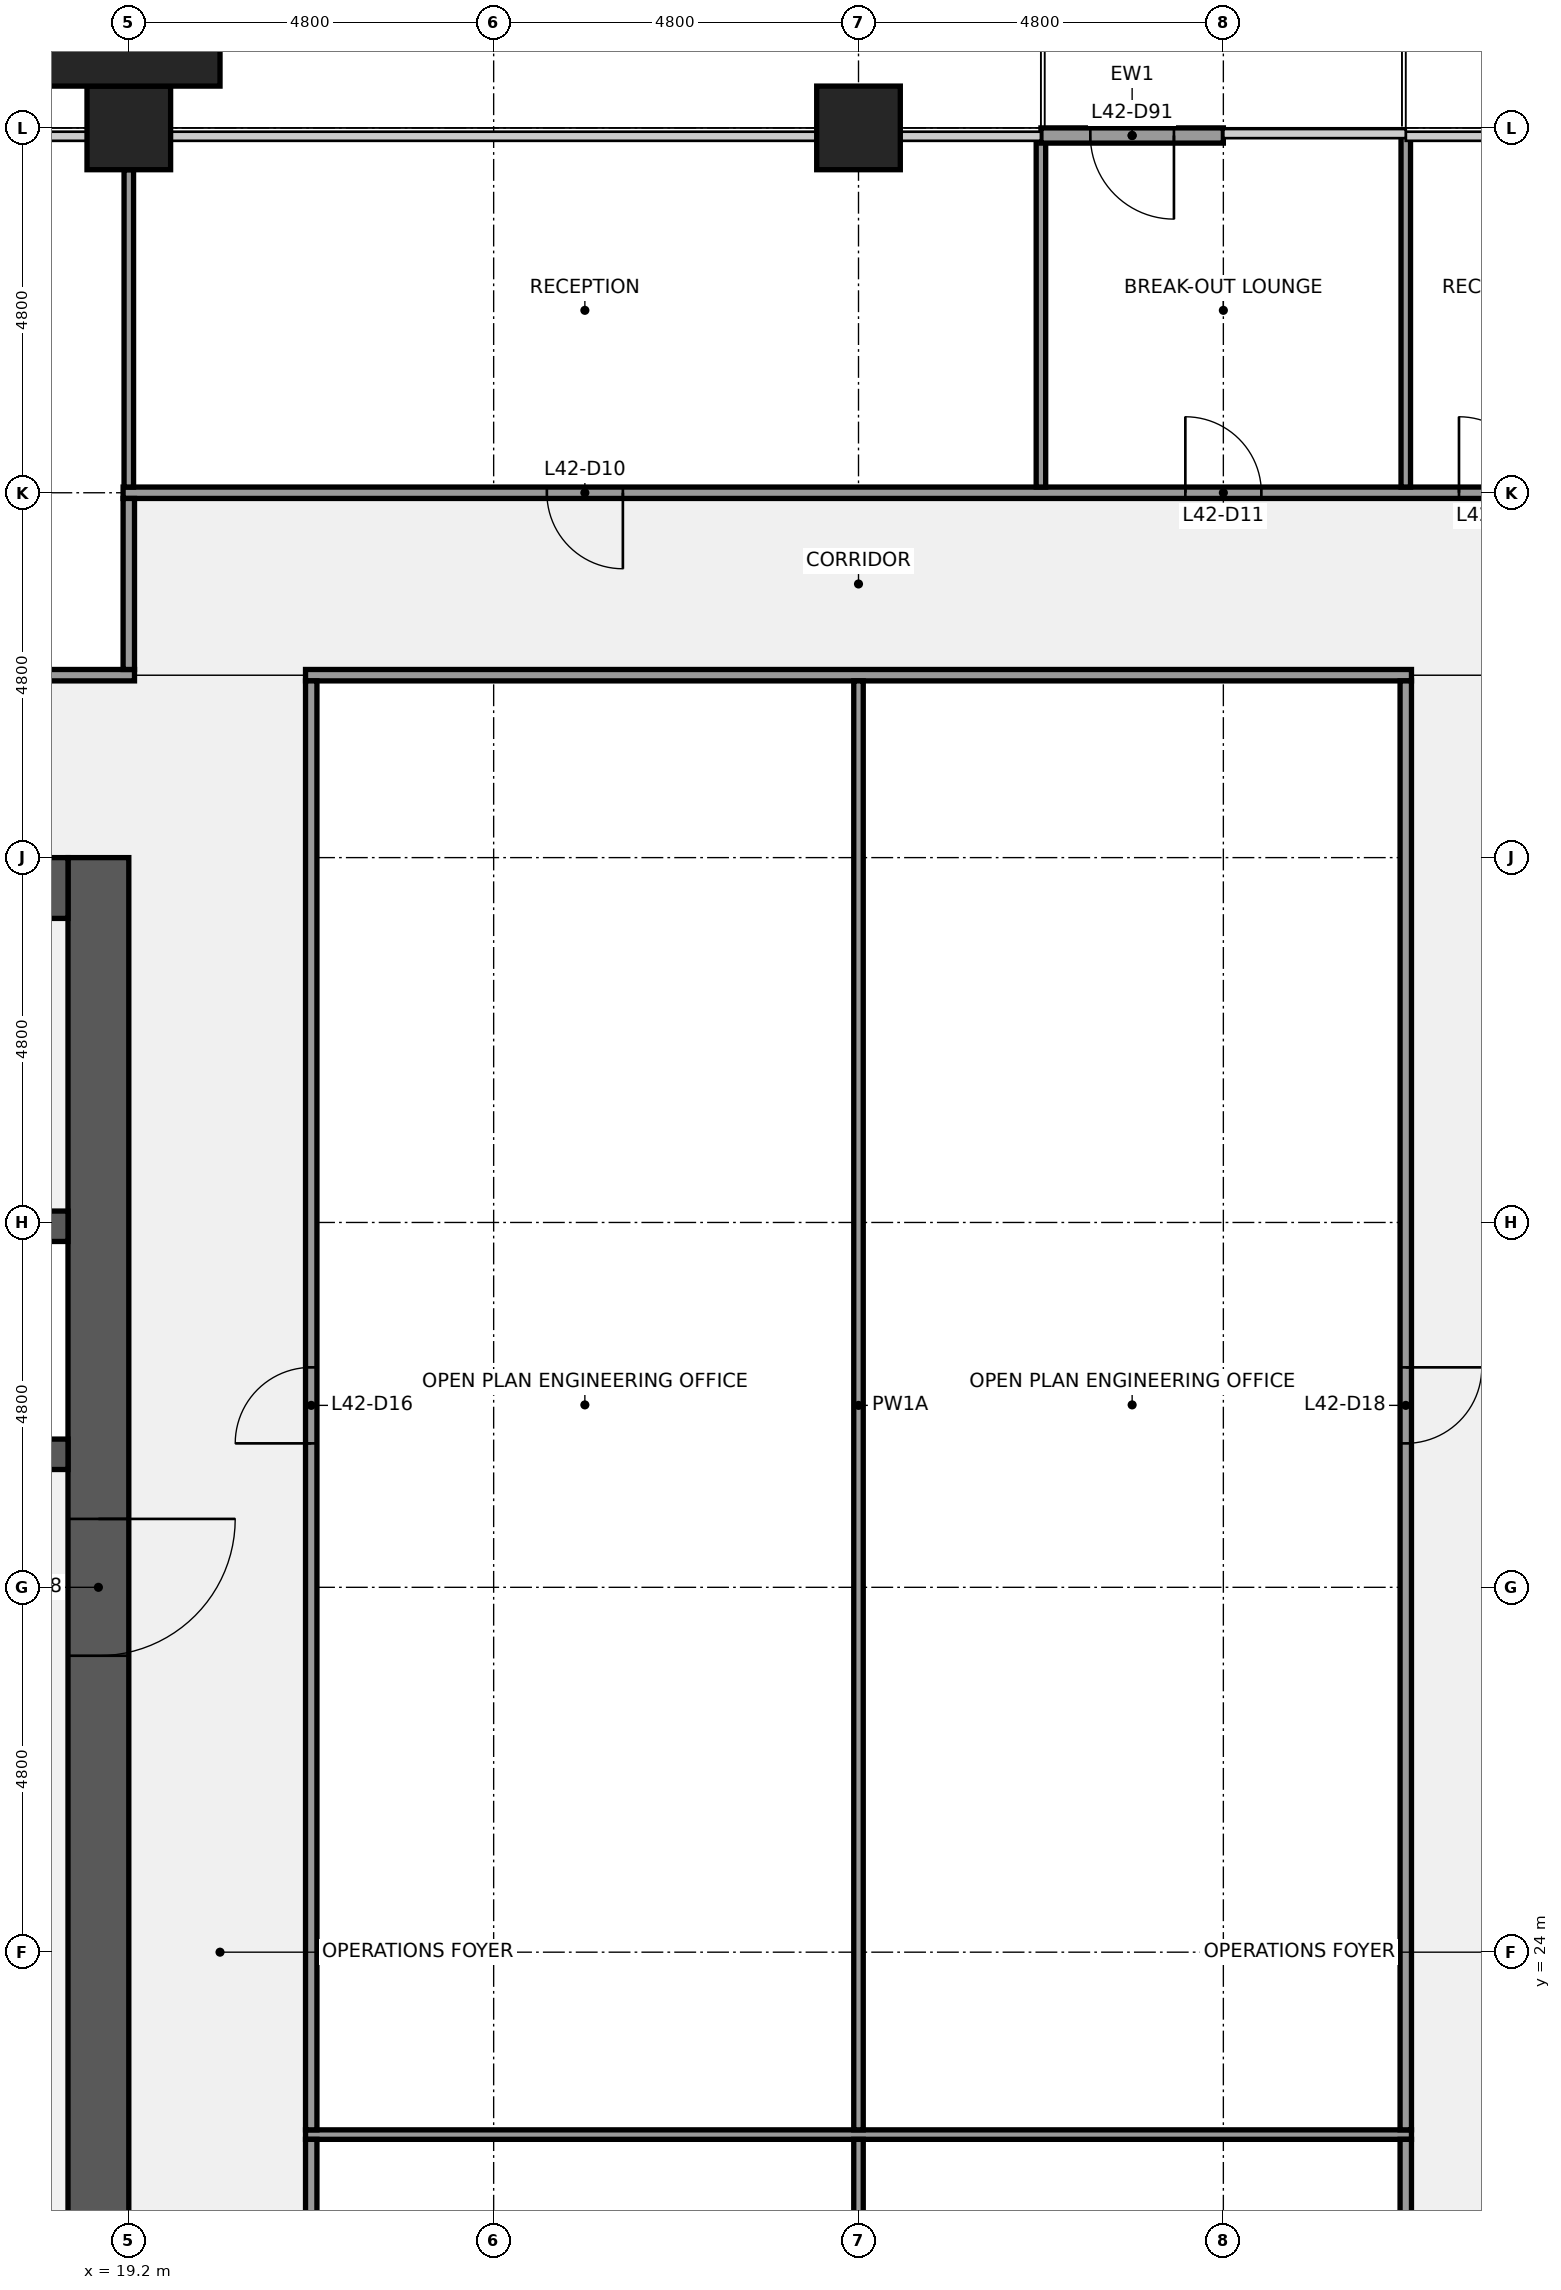
"""IFC4 building model, lengths in metres.
Left out: names, types, materials, properties, quantities, classifications, styles, units other than length and angle.
Written with IfcOpenShell. Run it as: python <this file> out.ifc"""

import sys

from ifc_helpers import new_model, si_unit, direction, frame, frame_2d, origin, origin_2d, place, context, subcontext, project, spatial, rectangle, extrude, element, fill, save


model = new_model("IFC4")
c1 = context("Model", 3, precision=1e-05, world=origin(), true_north=direction((0.0, 1.0)))
c2 = subcontext(c1, "Body", "Model", "MODEL_VIEW")
j1 = project(units=[si_unit("LENGTHUNIT", "METRE"), si_unit("PLANEANGLEUNIT", "RADIAN")], contexts=[c1])
p1 = place(None, origin())
s1 = spatial("IfcSite", under=j1, at=p1, CompositionType="ELEMENT")
p2 = place(p1, origin())
s2 = spatial("IfcBuilding", under=s1, at=p2, CompositionType="ELEMENT")
p3 = place(p2, frame((0.0, 0.0, 197.2)))
s3 = spatial("IfcBuildingStorey", under=s2, at=p3, CompositionType="ELEMENT", Elevation=197.2)
for number, where, z_axis, x_axis in (
    (1, (19.2, 48.0, 0.0), (0.0, 0.0, 1.0), (1.0, 0.0, 0.0)),
    (2, (28.8, 48.0, 0.0), (0.0, 0.0, 1.0), (1.0, 0.0, 0.0)),
):
    element("IfcColumn", number, at=place(p3, frame(where, z_axis=z_axis, x_axis=x_axis)), inside=s3, PredefinedType="COLUMN", context=c2, shape_type="SweptSolid", body=[
        extrude(rectangle(XDim=1.1, YDim=1.1, at=origin_2d()), origin(), (0.0, 0.0, 1.0), 4.0),
    ])
p4 = place(p3, frame((18.8, 38.4, 0.0), z_axis=(0.0, 0.0, 1.0), x_axis=(0.0, -1.0, 0.0)))
e3 = element("IfcWall", 3, at=p4, inside=s3, PredefinedType="SHEAR", context=c2, shape_type="SweptSolid", body=[
    extrude(rectangle(XDim=28.8, YDim=0.8, at=frame_2d((14.4, 0.0))), origin(), (0.0, 0.0, 1.0), 3.84),
])
p5 = place(p4, frame((18.3, 0.0, 0.0)))
e4 = element("IfcOpeningElement", 4, at=p5, cuts=e3, PredefinedType="OPENING", context=c2, shape_type="SweptSolid", body=[
    extrude(rectangle(XDim=1.8, YDim=2.1, at=frame_2d((0.9, 1.05))), frame((0.0, 0.41, 0.0), z_axis=(0.0, -1.0, 0.0), x_axis=(1.0, 0.0, 0.0)), (0.0, 0.0, 1.0), 0.82),
])
p6 = place(p4, frame((8.7, 0.0, 0.0)))
e5 = element("IfcOpeningElement", 5, at=p6, cuts=e3, PredefinedType="OPENING", context=c2, shape_type="SweptSolid", body=[
    extrude(rectangle(XDim=1.8, YDim=2.1, at=frame_2d((0.9, 1.05))), frame((0.0, 0.41, 0.0), z_axis=(0.0, -1.0, 0.0), x_axis=(1.0, 0.0, 0.0)), (0.0, 0.0, 1.0), 0.82),
])
p7 = place(p3, frame((0.8, 30.55, 0.0), z_axis=(0.0, 0.0, 1.0), x_axis=(1.0, 0.0, 0.0)))
e6 = element("IfcWall", 6, at=p7, inside=s3, PredefinedType="SHEAR", context=c2, shape_type="SweptSolid", body=[
    extrude(rectangle(XDim=17.6, YDim=0.4, at=frame_2d((8.8, 0.0))), origin(), (0.0, 0.0, 1.0), 3.84),
])
p8 = place(p7, frame((1.4, 0.0, 0.0)))
e7 = element("IfcOpeningElement", 7, at=p8, cuts=e6, PredefinedType="OPENING", context=c2, shape_type="SweptSolid", body=[
    extrude(rectangle(XDim=1.2, YDim=2.1, at=frame_2d((0.6, 1.05))), frame((0.0, 0.21, 0.0), z_axis=(0.0, -1.0, 0.0), x_axis=(1.0, 0.0, 0.0)), (0.0, 0.0, 1.0), 0.42),
])
p9 = place(p7, frame((4.0, 0.0, 0.0)))
e8 = element("IfcOpeningElement", 8, at=p9, cuts=e6, PredefinedType="OPENING", context=c2, shape_type="SweptSolid", body=[
    extrude(rectangle(XDim=1.2, YDim=2.1, at=frame_2d((0.6, 1.05))), frame((0.0, 0.21, 0.0), z_axis=(0.0, -1.0, 0.0), x_axis=(1.0, 0.0, 0.0)), (0.0, 0.0, 1.0), 0.42),
])
p10 = place(p7, frame((6.6, 0.0, 0.0)))
e9 = element("IfcOpeningElement", 9, at=p10, cuts=e6, PredefinedType="OPENING", context=c2, shape_type="SweptSolid", body=[
    extrude(rectangle(XDim=1.2, YDim=2.1, at=frame_2d((0.6, 1.05))), frame((0.0, 0.21, 0.0), z_axis=(0.0, -1.0, 0.0), x_axis=(1.0, 0.0, 0.0)), (0.0, 0.0, 1.0), 0.42),
])
p11 = place(p7, frame((9.8, 0.0, 0.0)))
e10 = element("IfcOpeningElement", 10, at=p11, cuts=e6, PredefinedType="OPENING", context=c2, shape_type="SweptSolid", body=[
    extrude(rectangle(XDim=1.2, YDim=2.1, at=frame_2d((0.6, 1.05))), frame((0.0, 0.21, 0.0), z_axis=(0.0, -1.0, 0.0), x_axis=(1.0, 0.0, 0.0)), (0.0, 0.0, 1.0), 0.42),
])
p12 = place(p7, frame((12.4, 0.0, 0.0)))
e11 = element("IfcOpeningElement", 11, at=p12, cuts=e6, PredefinedType="OPENING", context=c2, shape_type="SweptSolid", body=[
    extrude(rectangle(XDim=1.2, YDim=2.1, at=frame_2d((0.6, 1.05))), frame((0.0, 0.21, 0.0), z_axis=(0.0, -1.0, 0.0), x_axis=(1.0, 0.0, 0.0)), (0.0, 0.0, 1.0), 0.42),
])
p13 = place(p7, frame((15.0, 0.0, 0.0)))
e12 = element("IfcOpeningElement", 12, at=p13, cuts=e6, PredefinedType="OPENING", context=c2, shape_type="SweptSolid", body=[
    extrude(rectangle(XDim=1.2, YDim=2.1, at=frame_2d((0.6, 1.05))), frame((0.0, 0.21, 0.0), z_axis=(0.0, -1.0, 0.0), x_axis=(1.0, 0.0, 0.0)), (0.0, 0.0, 1.0), 0.42),
])
p14 = place(p3, frame((0.8, 33.55, 0.0), z_axis=(0.0, 0.0, 1.0), x_axis=(1.0, 0.0, 0.0)))
e13 = element("IfcWall", 13, at=p14, inside=s3, PredefinedType="SHEAR", context=c2, shape_type="SweptSolid", body=[
    extrude(rectangle(XDim=17.6, YDim=0.4, at=frame_2d((8.8, 0.0))), origin(), (0.0, 0.0, 1.0), 3.84),
])
p15 = place(p3, frame((9.6, 38.0, 0.0), z_axis=(0.0, 0.0, 1.0), x_axis=(1.0, 0.0, 0.0)))
e14 = element("IfcWall", 14, at=p15, inside=s3, PredefinedType="SHEAR", context=c2, shape_type="SweptSolid", body=[
    extrude(rectangle(XDim=8.8, YDim=0.8, at=frame_2d((4.4, 0.0))), origin(), (0.0, 0.0, 1.0), 3.84),
])
p16 = place(p15, frame((6.65, 0.0, 0.0)))
e15 = element("IfcOpeningElement", 15, at=p16, cuts=e14, PredefinedType="OPENING", context=c2, shape_type="SweptSolid", body=[
    extrude(rectangle(XDim=1.1, YDim=2.1, at=frame_2d((0.55, 1.05))), frame((0.0, 0.41, 0.0), z_axis=(0.0, -1.0, 0.0), x_axis=(1.0, 0.0, 0.0)), (0.0, 0.0, 1.0), 0.82),
])
p17 = place(p3, frame((21.525, 21.6, 0.0), z_axis=(0.0, 0.0, 1.0), x_axis=(1.0, 0.0, 0.0)))
e16 = element("IfcWall", 16, at=p17, inside=s3, PredefinedType="PARTITIONING", context=c2, shape_type="SweptSolid", body=[
    extrude(rectangle(XDim=14.55, YDim=0.125, at=frame_2d((7.275, 0.0))), origin(), (0.0, 0.0, 1.0), 2.87),
])
p18 = place(p3, frame((14.325, 40.8, 0.0), z_axis=(0.0, 0.0, 1.0), x_axis=(1.0, 0.0, 0.0)))
e17 = element("IfcWall", 17, at=p18, inside=s3, PredefinedType="PARTITIONING", context=c2, shape_type="SweptSolid", body=[
    extrude(rectangle(XDim=4.95, YDim=0.15, at=frame_2d((2.475, 0.0))), origin(), (0.0, 0.0, 1.0), 2.87),
])
p19 = place(p18, frame((1.975, 0.0, 0.0)))
e18 = element("IfcOpeningElement", 18, at=p19, cuts=e17, PredefinedType="OPENING", context=c2, shape_type="SweptSolid", body=[
    extrude(rectangle(XDim=1.0, YDim=2.1, at=frame_2d((0.5, 1.05))), frame((0.0, 0.085, 0.0), z_axis=(0.0, -1.0, 0.0), x_axis=(1.0, 0.0, 0.0)), (0.0, 0.0, 1.0), 0.17),
])
p20 = place(p3, frame((21.525, 40.8, 0.0), z_axis=(0.0, 0.0, 1.0), x_axis=(1.0, 0.0, 0.0)))
e19 = element("IfcWall", 19, at=p20, inside=s3, PredefinedType="PARTITIONING", context=c2, shape_type="SweptSolid", body=[
    extrude(rectangle(XDim=14.55, YDim=0.15, at=frame_2d((7.275, 0.0))), origin(), (0.0, 0.0, 1.0), 2.87),
])
p21 = place(p3, frame((19.125, 43.2, 0.0), z_axis=(0.0, 0.0, 1.0), x_axis=(1.0, 0.0, 0.0)))
e20 = element("IfcWall", 20, at=p21, inside=s3, PredefinedType="PARTITIONING", context=c2, shape_type="SweptSolid", body=[
    extrude(rectangle(XDim=19.35, YDim=0.15, at=frame_2d((9.675, 0.0))), origin(), (0.0, 0.0, 1.0), 2.87),
])
p22 = place(p21, frame((5.575, 0.0, 0.0)))
e21 = element("IfcOpeningElement", 21, at=p22, cuts=e20, PredefinedType="OPENING", context=c2, shape_type="SweptSolid", body=[
    extrude(rectangle(XDim=1.0, YDim=2.1, at=frame_2d((0.5, 1.05))), frame((0.0, 0.085, 0.0), z_axis=(0.0, -1.0, 0.0), x_axis=(1.0, 0.0, 0.0)), (0.0, 0.0, 1.0), 0.17),
])
p23 = place(p21, frame((13.975, 0.0, 0.0)))
e22 = element("IfcOpeningElement", 22, at=p23, cuts=e20, PredefinedType="OPENING", context=c2, shape_type="SweptSolid", body=[
    extrude(rectangle(XDim=1.0, YDim=2.1, at=frame_2d((0.5, 1.05))), frame((0.0, 0.085, 0.0), z_axis=(0.0, -1.0, 0.0), x_axis=(1.0, 0.0, 0.0)), (0.0, 0.0, 1.0), 0.17),
])
p24 = place(p21, frame((17.575, 0.0, 0.0)))
e23 = element("IfcOpeningElement", 23, at=p24, cuts=e20, PredefinedType="OPENING", context=c2, shape_type="SweptSolid", body=[
    extrude(rectangle(XDim=1.0, YDim=2.1, at=frame_2d((0.5, 1.05))), frame((0.0, 0.085, 0.0), z_axis=(0.0, -1.0, 0.0), x_axis=(1.0, 0.0, 0.0)), (0.0, 0.0, 1.0), 0.17),
])
p25 = place(p3, frame((19.2, 43.275, 0.0), z_axis=(0.0, 0.0, 1.0), x_axis=(0.0, 1.0, 0.0)))
e24 = element("IfcWall", 24, at=p25, inside=s3, PredefinedType="PARTITIONING", context=c2, shape_type="SweptSolid", body=[
    extrude(rectangle(XDim=4.175, YDim=0.125, at=frame_2d((2.087, 0.0))), origin(), (0.0, 0.0, 1.0), 2.87),
])
p26 = place(p3, frame((19.2, 40.875, 0.0), z_axis=(0.0, 0.0, 1.0), x_axis=(0.0, 1.0, 0.0)))
e25 = element("IfcWall", 25, at=p26, inside=s3, PredefinedType="PARTITIONING", context=c2, shape_type="SweptSolid", body=[
    extrude(rectangle(XDim=2.25, YDim=0.15, at=frame_2d((1.125, 0.0))), origin(), (0.0, 0.0, 1.0), 2.87),
])
p27 = place(p3, frame((21.6, 12.062, 0.0), z_axis=(0.0, 0.0, 1.0), x_axis=(0.0, 1.0, 0.0)))
e26 = element("IfcWall", 26, at=p27, inside=s3, PredefinedType="PARTITIONING", context=c2, shape_type="SweptSolid", body=[
    extrude(rectangle(XDim=9.475, YDim=0.15, at=frame_2d((4.738, 0.0))), origin(), (0.0, 0.0, 1.0), 2.87),
])
p28 = place(p27, frame((4.238, 0.0, 0.0)))
e27 = element("IfcOpeningElement", 27, at=p28, cuts=e26, PredefinedType="OPENING", context=c2, shape_type="SweptSolid", body=[
    extrude(rectangle(XDim=1.0, YDim=2.1, at=frame_2d((0.5, 1.05))), frame((0.0, 0.085, 0.0), z_axis=(0.0, -1.0, 0.0), x_axis=(1.0, 0.0, 0.0)), (0.0, 0.0, 1.0), 0.17),
])
p29 = place(p3, frame((21.6, 21.663, 0.0), z_axis=(0.0, 0.0, 1.0), x_axis=(0.0, 1.0, 0.0)))
e28 = element("IfcWall", 28, at=p29, inside=s3, PredefinedType="PARTITIONING", context=c2, shape_type="SweptSolid", body=[
    extrude(rectangle(XDim=19.062, YDim=0.15, at=frame_2d((9.531, 0.0))), origin(), (0.0, 0.0, 1.0), 2.87),
])
p30 = place(p29, frame((9.031, 0.0, 0.0)))
e29 = element("IfcOpeningElement", 29, at=p30, cuts=e28, PredefinedType="OPENING", context=c2, shape_type="SweptSolid", body=[
    extrude(rectangle(XDim=1.0, YDim=2.1, at=frame_2d((0.5, 1.05))), frame((0.0, 0.085, 0.0), z_axis=(0.0, -1.0, 0.0), x_axis=(1.0, 0.0, 0.0)), (0.0, 0.0, 1.0), 0.17),
])
p31 = place(p3, frame((28.8, 12.062, 0.0), z_axis=(0.0, 0.0, 1.0), x_axis=(0.0, 1.0, 0.0)))
e30 = element("IfcWall", 30, at=p31, inside=s3, PredefinedType="PARTITIONING", context=c2, shape_type="SweptSolid", body=[
    extrude(rectangle(XDim=9.475, YDim=0.125, at=frame_2d((4.738, 0.0))), origin(), (0.0, 0.0, 1.0), 2.87),
])
p32 = place(p3, frame((28.8, 21.663, 0.0), z_axis=(0.0, 0.0, 1.0), x_axis=(0.0, 1.0, 0.0)))
e31 = element("IfcWall", 31, at=p32, inside=s3, PredefinedType="PARTITIONING", context=c2, shape_type="SweptSolid", body=[
    extrude(rectangle(XDim=19.062, YDim=0.125, at=frame_2d((9.531, 0.0))), origin(), (0.0, 0.0, 1.0), 2.87),
])
for number, where, z_axis, x_axis in (
    (32, (31.2, 43.275, 0.0), (0.0, 0.0, 1.0), (0.0, 1.0, 0.0)),
    (33, (36.0, 43.275, 0.0), (0.0, 0.0, 1.0), (0.0, 1.0, 0.0)),
):
    element("IfcWall", number, at=place(p3, frame(where, z_axis=z_axis, x_axis=x_axis)), inside=s3, PredefinedType="PARTITIONING", context=c2, shape_type="SweptSolid", body=[
        extrude(rectangle(XDim=4.625, YDim=0.125, at=frame_2d((2.312, 0.0))), origin(), (0.0, 0.0, 1.0), 2.87),
    ])
p33 = place(p3, frame((36.0, 12.062, 0.0), z_axis=(0.0, 0.0, 1.0), x_axis=(0.0, 1.0, 0.0)))
e34 = element("IfcWall", 34, at=p33, inside=s3, PredefinedType="PARTITIONING", context=c2, shape_type="SweptSolid", body=[
    extrude(rectangle(XDim=9.475, YDim=0.15, at=frame_2d((4.738, 0.0))), origin(), (0.0, 0.0, 1.0), 2.87),
])
p34 = place(p33, frame((4.238, 0.0, 0.0)))
e35 = element("IfcOpeningElement", 35, at=p34, cuts=e34, PredefinedType="OPENING", context=c2, shape_type="SweptSolid", body=[
    extrude(rectangle(XDim=1.0, YDim=2.1, at=frame_2d((0.5, 1.05))), frame((0.0, 0.085, 0.0), z_axis=(0.0, -1.0, 0.0), x_axis=(1.0, 0.0, 0.0)), (0.0, 0.0, 1.0), 0.17),
])
p35 = place(p3, frame((36.0, 21.663, 0.0), z_axis=(0.0, 0.0, 1.0), x_axis=(0.0, 1.0, 0.0)))
e36 = element("IfcWall", 36, at=p35, inside=s3, PredefinedType="PARTITIONING", context=c2, shape_type="SweptSolid", body=[
    extrude(rectangle(XDim=19.062, YDim=0.15, at=frame_2d((9.531, 0.0))), origin(), (0.0, 0.0, 1.0), 2.87),
])
p36 = place(p35, frame((9.031, 0.0, 0.0)))
e37 = element("IfcOpeningElement", 37, at=p36, cuts=e36, PredefinedType="OPENING", context=c2, shape_type="SweptSolid", body=[
    extrude(rectangle(XDim=1.0, YDim=2.1, at=frame_2d((0.5, 1.05))), frame((0.0, 0.085, 0.0), z_axis=(0.0, -1.0, 0.0), x_axis=(1.0, 0.0, 0.0)), (0.0, 0.0, 1.0), 0.17),
])
p37 = place(p3, frame((33.6, 47.9, 0.0), z_axis=(0.0, 0.0, 1.0), x_axis=(-1.0, 0.0, 0.0)))
e38 = element("IfcWall", 38, at=p37, inside=s3, PredefinedType="SOLIDWALL", context=c2, shape_type="SweptSolid", body=[
    extrude(rectangle(XDim=2.4, YDim=0.2, at=frame_2d((1.2, 0.0))), origin(), (0.0, 0.0, 1.0), 3.314),
])
p38 = place(p37, frame((0.65, 0.0, 0.0)))
e39 = element("IfcOpeningElement", 39, at=p38, cuts=e38, PredefinedType="OPENING", context=c2, shape_type="SweptSolid", body=[
    extrude(rectangle(XDim=1.1, YDim=2.1, at=frame_2d((0.55, 1.05))), frame((0.0, 0.11, 0.0), z_axis=(0.0, -1.0, 0.0), x_axis=(1.0, 0.0, 0.0)), (0.0, 0.0, 1.0), 0.22),
])
p39 = place(p3, frame((19.2, 49.025, 0.0), z_axis=(0.0, 0.0, 1.0), x_axis=(1.0, 0.0, 0.0)))
e40 = element("IfcColumn", 40, at=p39, inside=s3, PredefinedType="PILASTER", context=c2, shape_type="SweptSolid", body=[
    extrude(rectangle(XDim=2.4, YDim=0.95, at=origin_2d()), origin(), (0.0, 0.0, 1.0), 4.0),
])
p40 = place(p6, origin())
e41 = element("IfcDoor", 41, at=p40, inside=s3, OperationType="DOUBLE_DOOR_SINGLE_SWING", PredefinedType="DOOR", context=c2, shape_type="SweptSolid", body=[
    extrude(rectangle(XDim=1.8, YDim=2.1, at=frame_2d((0.9, 1.05))), frame((0.0, 0.025, 0.0), z_axis=(0.0, -1.0, 0.0), x_axis=(1.0, 0.0, 0.0)), (0.0, 0.0, 1.0), 0.05),
])
fill(e5, e41)
p41 = place(p22, origin())
e42 = element("IfcDoor", 42, at=p41, inside=s3, OperationType="SINGLE_SWING_RIGHT", PredefinedType="DOOR", context=c2, shape_type="SweptSolid", body=[
    extrude(rectangle(XDim=1.0, YDim=2.1, at=frame_2d((0.5, 1.05))), frame((0.0, 0.025, 0.0), z_axis=(0.0, -1.0, 0.0), x_axis=(1.0, 0.0, 0.0)), (0.0, 0.0, 1.0), 0.05),
])
fill(e21, e42)
p42 = place(p23, origin())
e43 = element("IfcDoor", 43, at=p42, inside=s3, OperationType="SINGLE_SWING_LEFT", PredefinedType="DOOR", context=c2, shape_type="SweptSolid", body=[
    extrude(rectangle(XDim=1.0, YDim=2.1, at=frame_2d((0.5, 1.05))), frame((0.0, 0.025, 0.0), z_axis=(0.0, -1.0, 0.0), x_axis=(1.0, 0.0, 0.0)), (0.0, 0.0, 1.0), 0.05),
])
fill(e22, e43)
p43 = place(p24, origin())
e44 = element("IfcDoor", 44, at=p43, inside=s3, OperationType="SINGLE_SWING_LEFT", PredefinedType="DOOR", context=c2, shape_type="SweptSolid", body=[
    extrude(rectangle(XDim=1.0, YDim=2.1, at=frame_2d((0.5, 1.05))), frame((0.0, 0.025, 0.0), z_axis=(0.0, -1.0, 0.0), x_axis=(1.0, 0.0, 0.0)), (0.0, 0.0, 1.0), 0.05),
])
fill(e23, e44)
p44 = place(p30, origin())
e45 = element("IfcDoor", 45, at=p44, inside=s3, OperationType="SINGLE_SWING_LEFT", PredefinedType="DOOR", context=c2, shape_type="SweptSolid", body=[
    extrude(rectangle(XDim=1.0, YDim=2.1, at=frame_2d((0.5, 1.05))), frame((0.0, 0.025, 0.0), z_axis=(0.0, -1.0, 0.0), x_axis=(1.0, 0.0, 0.0)), (0.0, 0.0, 1.0), 0.05),
])
fill(e29, e45)
p45 = place(p36, origin())
e46 = element("IfcDoor", 46, at=p45, inside=s3, OperationType="SINGLE_SWING_RIGHT", PredefinedType="DOOR", context=c2, shape_type="SweptSolid", body=[
    extrude(rectangle(XDim=1.0, YDim=2.1, at=frame_2d((0.5, 1.05))), frame((0.0, 0.025, 0.0), z_axis=(0.0, -1.0, 0.0), x_axis=(1.0, 0.0, 0.0)), (0.0, 0.0, 1.0), 0.05),
])
fill(e37, e46)
p46 = place(p38, origin())
e47 = element("IfcDoor", 47, at=p46, inside=s3, OperationType="SINGLE_SWING_LEFT", PredefinedType="DOOR", context=c2, shape_type="SweptSolid", body=[
    extrude(rectangle(XDim=1.1, YDim=2.1, at=frame_2d((0.55, 1.05))), frame((0.0, 0.025, 0.0), z_axis=(0.0, -1.0, 0.0), x_axis=(1.0, 0.0, 0.0)), (0.0, 0.0, 1.0), 0.05),
])
fill(e39, e47)
save(model, sys.argv[1])
